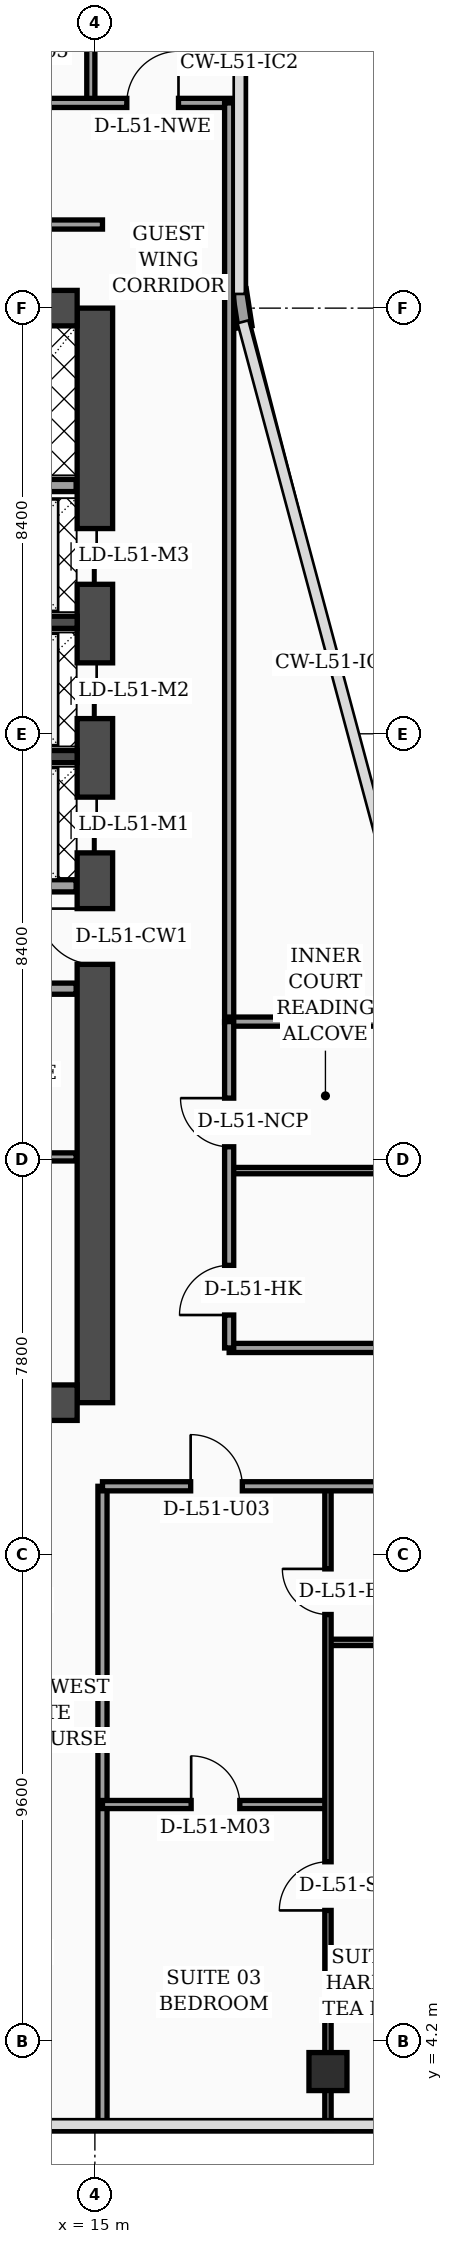
"""IFC4 building model, lengths in metres.
Left out: names, types, materials, properties, quantities, classifications, styles, units other than length and angle.
Written with IfcOpenShell. Run it as: python <this file> out.ifc"""

import sys

from ifc_helpers import new_model, si_unit, direction, frame, frame_2d, origin, origin_2d, place, context, subcontext, project, spatial, rectangle, hollow_rectangle, extrude, element, fill, save


model = new_model("IFC4")
c1 = context("Model", 3, precision=1e-05, world=origin(), true_north=direction((0.0, 1.0)))
c2 = subcontext(c1, "Body", "Model", "MODEL_VIEW")
j1 = project(units=[si_unit("LENGTHUNIT", "METRE"), si_unit("PLANEANGLEUNIT", "RADIAN")], contexts=[c1])
p1 = place(None, origin())
s1 = spatial("IfcSite", under=j1, at=p1, CompositionType="ELEMENT")
p2 = place(p1, origin())
s2 = spatial("IfcBuilding", under=s1, at=p2, CompositionType="ELEMENT")
p3 = place(p2, frame((0.0, 0.0, 207.2)))
s3 = spatial("IfcBuildingStorey", under=s2, at=p3, CompositionType="ELEMENT", Elevation=207.2)
p4 = place(p3, frame((15.0, 16.8, 0.0), z_axis=(0.0, 0.0, 1.0), x_axis=(0.0, 1.0, 0.0)))
e1 = element("IfcWall", 1, at=p4, inside=s3, PredefinedType="SHEAR", context=c2, shape_type="SweptSolid", body=[
    extrude(rectangle(XDim=21.6, YDim=0.7, at=frame_2d((10.8, 0.0))), origin(), (0.0, 0.0, 1.0), 3.56),
])
p5 = place(p4, frame((8.65, 0.0, 0.0)))
e2 = element("IfcOpeningElement", 2, at=p5, cuts=e1, PredefinedType="OPENING", context=c2, shape_type="SweptSolid", body=[
    extrude(rectangle(XDim=1.1, YDim=2.2, at=frame_2d((0.55, 1.1))), frame((0.0, 0.36, 0.0), z_axis=(0.0, -1.0, 0.0), x_axis=(1.0, 0.0, 0.0)), (0.0, 0.0, 1.0), 0.72),
])
p6 = place(p4, frame((10.85, 0.0, 0.0)))
e3 = element("IfcOpeningElement", 3, at=p6, cuts=e1, PredefinedType="OPENING", context=c2, shape_type="SweptSolid", body=[
    extrude(rectangle(XDim=1.1, YDim=2.2, at=frame_2d((0.55, 1.1))), frame((0.0, 0.36, 0.0), z_axis=(0.0, -1.0, 0.0), x_axis=(1.0, 0.0, 0.0)), (0.0, 0.0, 1.0), 0.72),
])
p7 = place(p4, frame((13.5, 0.0, 0.0)))
e4 = element("IfcOpeningElement", 4, at=p7, cuts=e1, PredefinedType="OPENING", context=c2, shape_type="SweptSolid", body=[
    extrude(rectangle(XDim=1.1, YDim=2.2, at=frame_2d((0.55, 1.1))), frame((0.0, 0.36, 0.0), z_axis=(0.0, -1.0, 0.0), x_axis=(1.0, 0.0, 0.0)), (0.0, 0.0, 1.0), 0.72),
])
p8 = place(p4, frame((16.15, 0.0, 0.0)))
e5 = element("IfcOpeningElement", 5, at=p8, cuts=e1, PredefinedType="OPENING", context=c2, shape_type="SweptSolid", body=[
    extrude(rectangle(XDim=1.1, YDim=2.2, at=frame_2d((0.55, 1.1))), frame((0.0, 0.36, 0.0), z_axis=(0.0, -1.0, 0.0), x_axis=(1.0, 0.0, 0.0)), (0.0, 0.0, 1.0), 0.72),
])
for number, where, z_axis, x_axis in (
    (6, (4.55, 38.4, 0.0), (0.0, 0.0, 1.0), (1.0, 0.0, 0.0)),
    (7, (4.55, 16.8, 0.0), (0.0, 0.0, 1.0), (1.0, 0.0, 0.0)),
):
    element("IfcWall", number, at=place(p3, frame(where, z_axis=z_axis, x_axis=x_axis)), inside=s3, PredefinedType="SHEAR", context=c2, shape_type="SweptSolid", body=[
        extrude(rectangle(XDim=10.1, YDim=0.7, at=frame_2d((5.05, 0.0))), origin(), (0.0, 0.0, 1.0), 3.56),
    ])
for number, where, z_axis, x_axis in (
    (8, (12.18, 29.55, 0.0), (0.0, 0.0, 1.0), (1.0, 0.0, 0.0)),
    (9, (12.18, 32.2, 0.0), (0.0, 0.0, 1.0), (1.0, 0.0, 0.0)),
):
    element("IfcWall", number, at=place(p3, frame(where, z_axis=z_axis, x_axis=x_axis)), inside=s3, PredefinedType="SOLIDWALL", context=c2, shape_type="SweptSolid", body=[
        extrude(rectangle(XDim=2.47, YDim=0.24, at=frame_2d((1.235, 0.0))), origin(), (0.0, 0.0, 1.0), 3.56),
    ])
p9 = place(p3, frame((19.6, 3.6, 0.0), z_axis=(0.0, 0.0, 1.0), x_axis=(1.0, 0.0, 0.0)))
e10 = element("IfcColumn", 10, at=p9, inside=s3, PredefinedType="COLUMN", context=c2, shape_type="SweptSolid", body=[
    extrude(hollow_rectangle(XDim=0.75, YDim=0.75, WallThickness=0.032, at=origin_2d()), origin(), (0.0, 0.0, 1.0), 3.56),
])
p10 = place(p3, frame((17.962, 38.03, 0.0), z_axis=(0.0, 0.0, 1.0), x_axis=(-0.15141125477, 0.988470855377, 0.0)))
e11 = element("IfcWall", 11, at=p10, inside=s3, PredefinedType="SOLIDWALL", context=c2, shape_type="SweptSolid", body=[
    extrude(rectangle(XDim=0.739, YDim=0.28, at=frame_2d((0.369, 0.0))), origin(), (0.0, 0.0, 1.0), 3.56),
])
p11 = place(p3, frame((9.68, 21.65, 0.0), z_axis=(0.0, 0.0, 1.0), x_axis=(1.0, 0.0, 0.0)))
e12 = element("IfcWall", 12, at=p11, inside=s3, PredefinedType="PARTITIONING", context=c2, shape_type="SweptSolid", body=[
    extrude(rectangle(XDim=4.95, YDim=0.16, at=frame_2d((2.475, 0.0))), origin(), (0.0, 0.0, 1.0), 3.09),
])
p12 = place(p11, frame((1.1, 0.0, 0.0)))
e13 = element("IfcOpeningElement", 13, at=p12, cuts=e12, PredefinedType="OPENING", context=c2, shape_type="SweptSolid", body=[
    extrude(rectangle(XDim=0.98, YDim=2.15, at=frame_2d((0.49, 1.075))), frame((0.0, 0.09, 0.0), z_axis=(0.0, -1.0, 0.0), x_axis=(1.0, 0.0, 0.0)), (0.0, 0.0, 1.0), 0.18),
])
p13 = place(p3, frame((9.68, 24.97, 0.0), z_axis=(0.0, 0.0, 1.0), x_axis=(1.0, 0.0, 0.0)))
e14 = element("IfcWall", 14, at=p13, inside=s3, PredefinedType="SOLIDWALL", context=c2, shape_type="SweptSolid", body=[
    extrude(rectangle(XDim=4.95, YDim=0.22, at=frame_2d((2.475, 0.0))), origin(), (0.0, 0.0, 1.0), 2.94),
])
p14 = place(p13, frame((0.9, 0.0, 0.0)))
e15 = element("IfcOpeningElement", 15, at=p14, cuts=e14, PredefinedType="OPENING", context=c2, shape_type="SweptSolid", body=[
    extrude(rectangle(XDim=0.98, YDim=2.15, at=frame_2d((0.49, 1.075))), frame((0.0, 0.12, 0.0), z_axis=(0.0, -1.0, 0.0), x_axis=(1.0, 0.0, 0.0)), (0.0, 0.0, 1.0), 0.24),
])
p15 = place(p3, frame((12.25, 27.0, 0.0), z_axis=(0.0, 0.0, 1.0), x_axis=(1.0, 0.0, 0.0)))
e16 = element("IfcWall", 16, at=p15, inside=s3, PredefinedType="SOLIDWALL", context=c2, shape_type="SweptSolid", body=[
    extrude(rectangle(XDim=2.38, YDim=0.24, at=frame_2d((1.19, 0.0))), origin(), (0.0, 0.0, 1.0), 3.56),
])
p16 = place(p3, frame((9.66, 34.9, 0.0), z_axis=(0.0, 0.0, 1.0), x_axis=(1.0, 0.0, 0.0)))
e17 = element("IfcWall", 17, at=p16, inside=s3, PredefinedType="SOLIDWALL", context=c2, shape_type="SweptSolid", body=[
    extrude(rectangle(XDim=4.97, YDim=0.24, at=frame_2d((2.485, 0.0))), origin(), (0.0, 0.0, 1.0), 3.56),
])
p17 = place(p3, frame((15.15, 2.44, 0.0), z_axis=(0.0, 0.0, 1.0), x_axis=(0.0, 1.0, 0.0)))
e18 = element("IfcWall", 18, at=p17, inside=s3, PredefinedType="PARTITIONING", context=c2, shape_type="SweptSolid", body=[
    extrude(rectangle(XDim=12.71, YDim=0.18, at=frame_2d((6.355, 0.0))), origin(), (0.0, 0.0, 1.0), 3.09),
])
p18 = place(p3, frame((19.6, 12.07, 0.0), z_axis=(0.0, 0.0, 1.0), x_axis=(1.0, 0.0, 0.0)))
e19 = element("IfcWall", 19, at=p18, inside=s3, PredefinedType="PARTITIONING", context=c2, shape_type="SweptSolid", body=[
    extrude(rectangle(XDim=2.0, YDim=0.125, at=frame_2d((1.0, 0.0))), origin(), (0.0, 0.0, 1.0), 3.56),
])
p19 = place(p3, frame((15.15, 8.87, 0.0), z_axis=(0.0, 0.0, 1.0), x_axis=(1.0, 0.0, 0.0)))
e20 = element("IfcWall", 20, at=p19, inside=s3, PredefinedType="PARTITIONING", context=c2, shape_type="SweptSolid", body=[
    extrude(rectangle(XDim=4.45, YDim=0.16, at=frame_2d((2.225, 0.0))), origin(), (0.0, 0.0, 1.0), 3.56),
])
p20 = place(p19, frame((1.75, 0.0, 0.0)))
e21 = element("IfcOpeningElement", 21, at=p20, cuts=e20, PredefinedType="OPENING", context=c2, shape_type="SweptSolid", body=[
    extrude(rectangle(XDim=0.96, YDim=2.2, at=frame_2d((0.48, 1.1))), frame((0.0, 0.09, 0.0), z_axis=(0.0, -1.0, 0.0), x_axis=(1.0, 0.0, 0.0)), (0.0, 0.0, 1.0), 0.18),
])
p21 = place(p3, frame((19.6, 2.44, 0.0), z_axis=(0.0, 0.0, 1.0), x_axis=(0.0, 1.0, 0.0)))
e22 = element("IfcWall", 22, at=p21, inside=s3, PredefinedType="PARTITIONING", context=c2, shape_type="SweptSolid", body=[
    extrude(rectangle(XDim=12.71, YDim=0.125, at=frame_2d((6.355, 0.0))), origin(), (0.0, 0.0, 1.0), 2.59),
])
p22 = place(p21, frame((4.34, 0.0, 0.0)))
e23 = element("IfcOpeningElement", 23, at=p22, cuts=e22, PredefinedType="OPENING", context=c2, shape_type="SweptSolid", body=[
    extrude(rectangle(XDim=0.96, YDim=2.2, at=frame_2d((0.48, 1.1))), frame((0.0, 0.073, 0.0), z_axis=(0.0, -1.0, 0.0), x_axis=(1.0, 0.0, 0.0)), (0.0, 0.0, 1.0), 0.145),
])
p23 = place(p21, frame((10.18, 0.0, 0.0)))
e24 = element("IfcOpeningElement", 24, at=p23, cuts=e22, PredefinedType="OPENING", context=c2, shape_type="SweptSolid", body=[
    extrude(rectangle(XDim=0.9, YDim=2.15, at=frame_2d((0.45, 1.075))), frame((0.0, 0.073, 0.0), z_axis=(0.0, -1.0, 0.0), x_axis=(1.0, 0.0, 0.0)), (0.0, 0.0, 1.0), 0.145),
])
p24 = place(p3, frame((15.15, 15.15, 0.0), z_axis=(0.0, 0.0, 1.0), x_axis=(1.0, 0.0, 0.0)))
e25 = element("IfcWall", 25, at=p24, inside=s3, PredefinedType="PARTITIONING", context=c2, shape_type="SweptSolid", body=[
    extrude(rectangle(XDim=6.45, YDim=0.18, at=frame_2d((3.225, 0.0))), origin(), (0.0, 0.0, 1.0), 2.59),
])
p25 = place(p24, frame((1.74, 0.0, 0.0)))
e26 = element("IfcOpeningElement", 26, at=p25, cuts=e25, PredefinedType="OPENING", context=c2, shape_type="SweptSolid", body=[
    extrude(rectangle(XDim=1.02, YDim=2.2, at=frame_2d((0.51, 1.1))), frame((0.0, 0.1, 0.0), z_axis=(0.0, -1.0, 0.0), x_axis=(1.0, 0.0, 0.0)), (0.0, 0.0, 1.0), 0.2),
])
p26 = place(p3, frame((14.92, 42.45, 0.0), z_axis=(0.0, 0.0, 1.0), x_axis=(0.0, 1.0, 0.0)))
e27 = element("IfcWall", 27, at=p26, inside=s3, PredefinedType="PARTITIONING", context=c2, shape_type="SweptSolid", body=[
    extrude(rectangle(XDim=5.35, YDim=0.16, at=frame_2d((2.675, 0.0))), origin(), (0.0, 0.0, 1.0), 3.09),
])
p27 = place(p3, frame((0.08, 42.45, 0.0), z_axis=(0.0, 0.0, 1.0), x_axis=(1.0, 0.0, 0.0)))
e28 = element("IfcWall", 28, at=p27, inside=s3, PredefinedType="PARTITIONING", context=c2, shape_type="SweptSolid", body=[
    extrude(rectangle(XDim=17.77, YDim=0.18, at=frame_2d((8.885, 0.0))), origin(), (0.0, 0.0, 1.0), 2.94),
])
p28 = place(p27, frame((0.9, 0.0, 0.0)))
e29 = element("IfcOpeningElement", 29, at=p28, cuts=e28, PredefinedType="OPENING", context=c2, shape_type="SweptSolid", body=[
    extrude(rectangle(XDim=1.02, YDim=2.2, at=frame_2d((0.51, 1.1))), frame((0.0, 0.1, 0.0), z_axis=(0.0, -1.0, 0.0), x_axis=(1.0, 0.0, 0.0)), (0.0, 0.0, 1.0), 0.2),
])
p29 = place(p27, frame((4.45, 0.0, 0.0)))
e30 = element("IfcOpeningElement", 30, at=p29, cuts=e28, PredefinedType="OPENING", context=c2, shape_type="SweptSolid", body=[
    extrude(rectangle(XDim=1.02, YDim=2.2, at=frame_2d((0.51, 1.1))), frame((0.0, 0.1, 0.0), z_axis=(0.0, -1.0, 0.0), x_axis=(1.0, 0.0, 0.0)), (0.0, 0.0, 1.0), 0.2),
])
p30 = place(p27, frame((10.33, 0.0, 0.0)))
e31 = element("IfcOpeningElement", 31, at=p30, cuts=e28, PredefinedType="OPENING", context=c2, shape_type="SweptSolid", body=[
    extrude(rectangle(XDim=1.02, YDim=2.2, at=frame_2d((0.51, 1.1))), frame((0.0, 0.1, 0.0), z_axis=(0.0, -1.0, 0.0), x_axis=(1.0, 0.0, 0.0)), (0.0, 0.0, 1.0), 0.2),
])
p31 = place(p27, frame((15.55, 0.0, 0.0)))
e32 = element("IfcOpeningElement", 32, at=p31, cuts=e28, PredefinedType="OPENING", context=c2, shape_type="SweptSolid", body=[
    extrude(rectangle(XDim=1.02, YDim=2.2, at=frame_2d((0.51, 1.1))), frame((0.0, 0.1, 0.0), z_axis=(0.0, -1.0, 0.0), x_axis=(1.0, 0.0, 0.0)), (0.0, 0.0, 1.0), 0.2),
])
p32 = place(p3, frame((17.65, 24.3, 0.0), z_axis=(0.0, 0.0, 1.0), x_axis=(0.0, 1.0, 0.0)))
e33 = element("IfcWall", 33, at=p32, inside=s3, PredefinedType="PARTITIONING", context=c2, shape_type="SweptSolid", body=[
    extrude(rectangle(XDim=18.15, YDim=0.18, at=frame_2d((9.075, 0.0))), origin(), (0.0, 0.0, 1.0), 2.94),
])
p33 = place(p3, frame((3.83, 40.05, 0.0), z_axis=(0.0, 0.0, 1.0), x_axis=(1.0, 0.0, 0.0)))
e34 = element("IfcWall", 34, at=p33, inside=s3, PredefinedType="PARTITIONING", context=c2, shape_type="SweptSolid", body=[
    extrude(rectangle(XDim=11.32, YDim=0.18, at=frame_2d((5.66, 0.0))), origin(), (0.0, 0.0, 1.0), 2.94),
])
p34 = place(p3, frame((17.65, 17.88, 0.0), z_axis=(0.0, 0.0, 1.0), x_axis=(1.0, 0.0, 0.0)))
e35 = element("IfcWall", 35, at=p34, inside=s3, PredefinedType="PARTITIONING", context=c2, shape_type="SweptSolid", body=[
    extrude(rectangle(XDim=3.9, YDim=0.18, at=frame_2d((1.95, 0.0))), origin(), (0.0, 0.0, 1.0), 3.56),
])
p35 = place(p3, frame((17.65, 21.38, 0.0), z_axis=(0.0, 0.0, 1.0), x_axis=(1.0, 0.0, 0.0)))
e36 = element("IfcWall", 36, at=p35, inside=s3, PredefinedType="PARTITIONING", context=c2, shape_type="SweptSolid", body=[
    extrude(rectangle(XDim=3.9, YDim=0.125, at=frame_2d((1.95, 0.0))), origin(), (0.0, 0.0, 1.0), 3.09),
])
p36 = place(p3, frame((17.65, 24.32, 0.0), z_axis=(0.0, 0.0, 1.0), x_axis=(1.0, 0.0, 0.0)))
e37 = element("IfcWall", 37, at=p36, inside=s3, PredefinedType="PARTITIONING", context=c2, shape_type="SweptSolid", body=[
    extrude(rectangle(XDim=3.95, YDim=0.18, at=frame_2d((1.975, 0.0))), origin(), (0.0, 0.0, 1.0), 3.56),
])
p37 = place(p3, frame((17.65, 17.88, 0.0), z_axis=(0.0, 0.0, 1.0), x_axis=(0.0, 1.0, 0.0)))
e38 = element("IfcWall", 38, at=p37, inside=s3, PredefinedType="PARTITIONING", context=c2, shape_type="SweptSolid", body=[
    extrude(rectangle(XDim=6.44, YDim=0.18, at=frame_2d((3.22, 0.0))), origin(), (0.0, 0.0, 1.0), 3.09),
])
p38 = place(p37, frame((0.65, 0.0, 0.0)))
e39 = element("IfcOpeningElement", 39, at=p38, cuts=e38, PredefinedType="OPENING", context=c2, shape_type="SweptSolid", body=[
    extrude(rectangle(XDim=0.98, YDim=2.15, at=frame_2d((0.49, 1.075))), frame((0.0, 0.1, 0.0), z_axis=(0.0, -1.0, 0.0), x_axis=(1.0, 0.0, 0.0)), (0.0, 0.0, 1.0), 0.2),
])
p39 = place(p37, frame((3.97, 0.0, 0.0)))
e40 = element("IfcOpeningElement", 40, at=p39, cuts=e38, PredefinedType="OPENING", context=c2, shape_type="SweptSolid", body=[
    extrude(rectangle(XDim=0.96, YDim=2.2, at=frame_2d((0.48, 1.1))), frame((0.0, 0.1, 0.0), z_axis=(0.0, -1.0, 0.0), x_axis=(1.0, 0.0, 0.0)), (0.0, 0.0, 1.0), 0.2),
])
p40 = place(p20, origin())
e41 = element("IfcDoor", 41, at=p40, inside=s3, OperationType="SINGLE_SWING_LEFT", PredefinedType="DOOR", context=c2, shape_type="SweptSolid", body=[
    extrude(rectangle(XDim=0.96, YDim=2.2, at=frame_2d((0.48, 1.1))), frame((0.0, 0.025, 0.0), z_axis=(0.0, -1.0, 0.0), x_axis=(1.0, 0.0, 0.0)), (0.0, 0.0, 1.0), 0.05),
])
fill(e21, e41)
p41 = place(p22, origin())
e42 = element("IfcDoor", 42, at=p41, inside=s3, OperationType="SINGLE_SWING_LEFT", PredefinedType="DOOR", context=c2, shape_type="SweptSolid", body=[
    extrude(rectangle(XDim=0.96, YDim=2.2, at=frame_2d((0.48, 1.1))), frame((0.0, 0.025, 0.0), z_axis=(0.0, -1.0, 0.0), x_axis=(1.0, 0.0, 0.0)), (0.0, 0.0, 1.0), 0.05),
])
fill(e23, e42)
p42 = place(p23, origin())
e43 = element("IfcDoor", 43, at=p42, inside=s3, OperationType="SINGLE_SWING_RIGHT", PredefinedType="DOOR", context=c2, shape_type="SweptSolid", body=[
    extrude(rectangle(XDim=0.9, YDim=2.15, at=frame_2d((0.45, 1.075))), frame((0.0, 0.025, 0.0), z_axis=(0.0, -1.0, 0.0), x_axis=(1.0, 0.0, 0.0)), (0.0, 0.0, 1.0), 0.05),
])
fill(e24, e43)
p43 = place(p25, origin())
e44 = element("IfcDoor", 44, at=p43, inside=s3, OperationType="SINGLE_SWING_LEFT", PredefinedType="DOOR", context=c2, shape_type="SweptSolid", body=[
    extrude(rectangle(XDim=1.02, YDim=2.2, at=frame_2d((0.51, 1.1))), frame((0.0, 0.025, 0.0), z_axis=(0.0, -1.0, 0.0), x_axis=(1.0, 0.0, 0.0)), (0.0, 0.0, 1.0), 0.05),
])
fill(e26, e44)
p44 = place(p31, origin())
e45 = element("IfcDoor", 45, at=p44, inside=s3, OperationType="SINGLE_SWING_RIGHT", PredefinedType="DOOR", context=c2, shape_type="SweptSolid", body=[
    extrude(rectangle(XDim=1.02, YDim=2.2, at=frame_2d((0.51, 1.1))), frame((0.0, 0.025, 0.0), z_axis=(0.0, -1.0, 0.0), x_axis=(1.0, 0.0, 0.0)), (0.0, 0.0, 1.0), 0.05),
])
fill(e32, e45)
p45 = place(p38, origin())
e46 = element("IfcDoor", 46, at=p45, inside=s3, OperationType="SINGLE_SWING_LEFT", PredefinedType="DOOR", context=c2, shape_type="SweptSolid", body=[
    extrude(rectangle(XDim=0.98, YDim=2.15, at=frame_2d((0.49, 1.075))), frame((0.0, 0.025, 0.0), z_axis=(0.0, -1.0, 0.0), x_axis=(1.0, 0.0, 0.0)), (0.0, 0.0, 1.0), 0.05),
])
fill(e39, e46)
p46 = place(p39, origin())
e47 = element("IfcDoor", 47, at=p46, inside=s3, OperationType="SINGLE_SWING_RIGHT", PredefinedType="DOOR", context=c2, shape_type="SweptSolid", body=[
    extrude(rectangle(XDim=0.96, YDim=2.2, at=frame_2d((0.48, 1.1))), frame((0.0, 0.025, 0.0), z_axis=(0.0, -1.0, 0.0), x_axis=(1.0, 0.0, 0.0)), (0.0, 0.0, 1.0), 0.05),
])
fill(e40, e47)
p47 = place(p5, origin())
e48 = element("IfcDoor", 48, at=p47, inside=s3, OperationType="SINGLE_SWING_RIGHT", PredefinedType="DOOR", context=c2, shape_type="SweptSolid", body=[
    extrude(rectangle(XDim=1.1, YDim=2.2, at=frame_2d((0.55, 1.1))), frame((0.0, 0.025, 0.0), z_axis=(0.0, -1.0, 0.0), x_axis=(1.0, 0.0, 0.0)), (0.0, 0.0, 1.0), 0.05),
])
fill(e2, e48)
p48 = place(p6, origin())
e49 = element("IfcDoor", 49, at=p48, inside=s3, OperationType="DOUBLE_DOOR_SLIDING", PredefinedType="DOOR", context=c2, shape_type="SweptSolid", body=[
    extrude(rectangle(XDim=1.1, YDim=2.2, at=frame_2d((0.55, 1.1))), frame((0.0, 0.025, 0.0), z_axis=(0.0, -1.0, 0.0), x_axis=(1.0, 0.0, 0.0)), (0.0, 0.0, 1.0), 0.05),
])
fill(e3, e49)
p49 = place(p7, origin())
e50 = element("IfcDoor", 50, at=p49, inside=s3, OperationType="DOUBLE_DOOR_SLIDING", PredefinedType="DOOR", context=c2, shape_type="SweptSolid", body=[
    extrude(rectangle(XDim=1.1, YDim=2.2, at=frame_2d((0.55, 1.1))), frame((0.0, 0.025, 0.0), z_axis=(0.0, -1.0, 0.0), x_axis=(1.0, 0.0, 0.0)), (0.0, 0.0, 1.0), 0.05),
])
fill(e4, e50)
p50 = place(p8, origin())
e51 = element("IfcDoor", 51, at=p50, inside=s3, OperationType="DOUBLE_DOOR_SLIDING", PredefinedType="DOOR", context=c2, shape_type="SweptSolid", body=[
    extrude(rectangle(XDim=1.1, YDim=2.2, at=frame_2d((0.55, 1.1))), frame((0.0, 0.025, 0.0), z_axis=(0.0, -1.0, 0.0), x_axis=(1.0, 0.0, 0.0)), (0.0, 0.0, 1.0), 0.05),
])
fill(e5, e51)
save(model, sys.argv[1])
